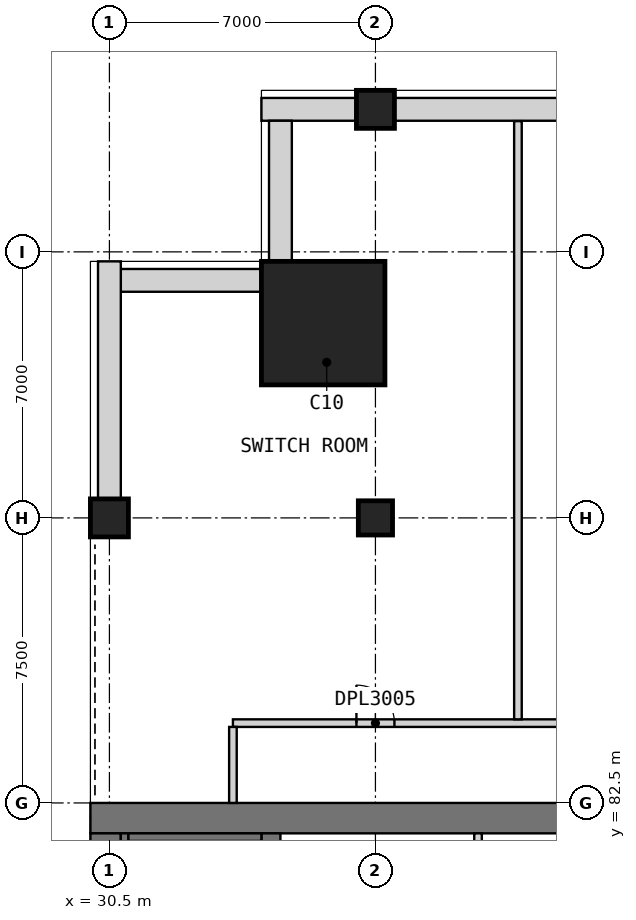
"""IFC4 building model, lengths in metres.
Left out: names, types, materials, properties, quantities, classifications, styles, units other than length and angle.
Written with IfcOpenShell. Run it as: python <this file> out.ifc"""

import sys

from ifc_helpers import new_model, si_unit, direction, frame, frame_2d, origin, origin_2d, place, context, subcontext, project, spatial, rectangle, extrude, element, fill, save


model = new_model("IFC4")
c1 = context("Model", 3, precision=1e-05, world=origin(), true_north=direction((0.0, 1.0)))
c2 = subcontext(c1, "Body", "Model", "MODEL_VIEW")
j1 = project(units=[si_unit("LENGTHUNIT", "METRE"), si_unit("PLANEANGLEUNIT", "RADIAN")], contexts=[c1])
p1 = place(None, origin())
s1 = spatial("IfcSite", under=j1, at=p1, CompositionType="ELEMENT")
p2 = place(p1, origin())
s2 = spatial("IfcBuilding", under=s1, at=p2, CompositionType="ELEMENT")
p3 = place(p2, frame((0.0, 0.0, 214.2)))
s3 = spatial("IfcBuildingStorey", under=s2, at=p3, CompositionType="ELEMENT", Elevation=214.2)
for number, where, z_axis, x_axis in (
    (1, (37.5, 100.75, 0.0), (0.0, 0.0, 1.0), (1.0, 0.0, 0.0)),
    (2, (30.5, 90.0, 0.0), (0.0, 0.0, 1.0), (1.0, 0.0, 0.0)),
):
    element("IfcColumn", number, at=place(p3, frame(where, z_axis=z_axis, x_axis=x_axis)), inside=s3, PredefinedType="COLUMN", context=c2, shape_type="SweptSolid", body=[
        extrude(rectangle(XDim=1.0, YDim=1.0, at=origin_2d()), origin(), (0.0, 0.0, 1.0), 5.5),
    ])
p4 = place(p3, frame((37.5, 90.0, 0.0), z_axis=(0.0, 0.0, 1.0), x_axis=(1.0, 0.0, 0.0)))
e3 = element("IfcColumn", 3, at=p4, inside=s3, PredefinedType="COLUMN", context=c2, shape_type="SweptSolid", body=[
    extrude(rectangle(XDim=0.9, YDim=0.9, at=origin_2d()), origin(), (0.0, 0.0, 1.0), 5.5),
])
p5 = place(p3, frame((36.125, 95.125, 0.0), z_axis=(0.0, 0.0, 1.0), x_axis=(0.0, -1.0, 0.0)))
e4 = element("IfcColumn", 4, at=p5, inside=s3, PredefinedType="COLUMN", context=c2, shape_type="SweptSolid", body=[
    extrude(rectangle(XDim=3.25, YDim=3.25, at=origin_2d()), origin(), (0.351, 0.032, 0.936), 5.877),
])
p6 = place(p3, frame((30.0, 82.1, 0.0), z_axis=(0.0, 0.0, 1.0), x_axis=(1.0, 0.0, 0.0)))
e5 = element("IfcWall", 5, at=p6, inside=s3, PredefinedType="SHEAR", context=c2, shape_type="SweptSolid", body=[
    extrude(rectangle(XDim=30.0, YDim=0.8, at=frame_2d((15.0, 0.0))), origin(), (0.0, 0.0, 1.0), 5.5),
])
p7 = place(p3, frame((30.4, 60.8, 0.0), z_axis=(0.0, 0.0, 1.0), x_axis=(0.0, 1.0, 0.0)))
e6 = element("IfcWall", 6, at=p7, inside=s3, PredefinedType="SHEAR", context=c2, shape_type="SweptSolid", body=[
    extrude(rectangle(XDim=20.9, YDim=0.8, at=frame_2d((10.45, 0.0))), origin(), (0.0, 0.0, 1.0), 5.5),
])
p8 = place(p3, frame((34.75, 78.3, 0.0), z_axis=(0.0, 0.0, 1.0), x_axis=(0.0, 1.0, 0.0)))
e7 = element("IfcWall", 7, at=p8, inside=s3, PredefinedType="SHEAR", context=c2, shape_type="SweptSolid", body=[
    extrude(rectangle(XDim=3.4, YDim=0.5, at=frame_2d((1.7, 0.0))), origin(), (0.0, 0.0, 1.0), 5.5),
])
p9 = place(p3, frame((44.5, 100.75, 0.0), z_axis=(0.0, 0.0, 1.0), x_axis=(-1.0, 0.0, 0.0)))
e8 = element("IfcWall", 8, at=p9, inside=s3, PredefinedType="ELEMENTEDWALL", context=c2, shape_type="SweptSolid", body=[
    extrude(rectangle(XDim=6.5, YDim=0.6, at=frame_2d((3.25, 0.0))), origin(), (0.0, 0.0, 1.0), 5.25),
])
p10 = place(p3, frame((37.0, 100.75, 0.0), z_axis=(0.0, 0.0, 1.0), x_axis=(-1.0, 0.0, 0.0)))
e9 = element("IfcWall", 9, at=p10, inside=s3, PredefinedType="ELEMENTEDWALL", context=c2, shape_type="SweptSolid", body=[
    extrude(rectangle(XDim=2.5, YDim=0.6, at=frame_2d((1.25, 0.0))), origin(), (0.0, 0.0, 1.0), 5.25),
])
for number, where, z_axis, x_axis in (
    (10, (35.0, 100.45, 0.0), (0.0, 0.0, 1.0), (0.0, -1.0, 0.0)),
    (11, (34.5, 96.25, 0.0), (0.0, 0.0, 1.0), (-1.0, 0.0, 0.0)),
):
    element("IfcWall", number, at=place(p3, frame(where, z_axis=z_axis, x_axis=x_axis)), inside=s3, PredefinedType="ELEMENTEDWALL", context=c2, shape_type="SweptSolid", body=[
        extrude(rectangle(XDim=3.7, YDim=0.6, at=frame_2d((1.85, 0.0))), origin(), (0.0, 0.0, 1.0), 5.25),
    ])
p11 = place(p3, frame((30.5, 96.75, 0.0), z_axis=(0.0, 0.0, 1.0), x_axis=(0.0, -1.0, 0.0)))
e12 = element("IfcWall", 12, at=p11, inside=s3, PredefinedType="ELEMENTEDWALL", context=c2, shape_type="SweptSolid", body=[
    extrude(rectangle(XDim=6.25, YDim=0.6, at=frame_2d((3.125, 0.0))), origin(), (0.0, 0.0, 1.0), 5.25),
])
p12 = place(p3, frame((40.2, 78.5, 0.0), z_axis=(0.0, 0.0, 1.0), x_axis=(0.0, 1.0, 0.0)))
e13 = element("IfcWall", 13, at=p12, inside=s3, PredefinedType="SOLIDWALL", context=c2, shape_type="SweptSolid", body=[
    extrude(rectangle(XDim=3.2, YDim=0.2, at=frame_2d((1.6, 0.0))), origin(), (0.0, 0.0, 1.0), 5.5),
])
p13 = place(p3, frame((30.9, 60.8, 0.0), z_axis=(0.0, 0.0, 1.0), x_axis=(0.0, 1.0, 0.0)))
e14 = element("IfcWall", 14, at=p13, inside=s3, PredefinedType="SOLIDWALL", context=c2, shape_type="SweptSolid", body=[
    extrude(rectangle(XDim=20.9, YDim=0.2, at=frame_2d((10.45, 0.0))), origin(), (0.0, 0.0, 1.0), 5.25),
])
p14 = place(p3, frame((31.0, 81.6, 0.0), z_axis=(0.0, 0.0, 1.0), x_axis=(1.0, 0.0, 0.0)))
e15 = element("IfcWall", 15, at=p14, inside=s3, PredefinedType="SOLIDWALL", context=c2, shape_type="SweptSolid", body=[
    extrude(rectangle(XDim=3.5, YDim=0.2, at=frame_2d((1.75, 0.0))), origin(), (0.0, 0.0, 1.0), 5.25),
])
p15 = place(p3, frame((33.75, 84.6, 0.0), z_axis=(0.0, 0.0, 1.0), x_axis=(1.0, 0.0, 0.0)))
e16 = element("IfcWall", 16, at=p15, inside=s3, PredefinedType="PARTITIONING", context=c2, shape_type="SweptSolid", body=[
    extrude(rectangle(XDim=28.35, YDim=0.2, at=frame_2d((14.175, 0.0))), origin(), (0.0, 0.0, 1.0), 5.25),
])
p16 = place(p15, frame((3.25, 0.0, 0.0)))
e17 = element("IfcOpeningElement", 17, at=p16, cuts=e16, PredefinedType="OPENING", context=c2, shape_type="SweptSolid", body=[
    extrude(rectangle(XDim=1.0, YDim=2.1, at=frame_2d((0.5, 1.05))), frame((0.0, 0.11, 0.0), z_axis=(0.0, -1.0, 0.0), x_axis=(1.0, 0.0, 0.0)), (0.0, 0.0, 1.0), 0.22),
])
p17 = place(p15, frame((14.5, 0.0, 0.0)))
e18 = element("IfcOpeningElement", 18, at=p17, cuts=e16, PredefinedType="OPENING", context=c2, shape_type="SweptSolid", body=[
    extrude(rectangle(XDim=1.0, YDim=2.1, at=frame_2d((0.5, 1.05))), frame((0.0, 0.11, 0.0), z_axis=(0.0, -1.0, 0.0), x_axis=(1.0, 0.0, 0.0)), (0.0, 0.0, 1.0), 0.22),
])
p18 = place(p15, frame((23.875, 0.0, 0.0)))
e19 = element("IfcOpeningElement", 19, at=p18, cuts=e16, PredefinedType="OPENING", context=c2, shape_type="SweptSolid", body=[
    extrude(rectangle(XDim=1.0, YDim=2.1, at=frame_2d((0.5, 1.05))), frame((0.0, 0.11, 0.0), z_axis=(0.0, -1.0, 0.0), x_axis=(1.0, 0.0, 0.0)), (0.0, 0.0, 1.0), 0.22),
])
p19 = place(p3, frame((33.75, 82.5, 0.0), z_axis=(0.0, 0.0, 1.0), x_axis=(0.0, 1.0, 0.0)))
e20 = element("IfcWall", 20, at=p19, inside=s3, PredefinedType="PARTITIONING", context=c2, shape_type="SweptSolid", body=[
    extrude(rectangle(XDim=2.0, YDim=0.2, at=frame_2d((1.0, 0.0))), origin(), (0.0, 0.0, 1.0), 5.25),
])
p20 = place(p3, frame((41.25, 84.7, 0.0), z_axis=(0.0, 0.0, 1.0), x_axis=(0.0, 1.0, 0.0)))
e21 = element("IfcWall", 21, at=p20, inside=s3, PredefinedType="PARTITIONING", context=c2, shape_type="SweptSolid", body=[
    extrude(rectangle(XDim=15.74, YDim=0.2, at=frame_2d((7.87, 0.0))), origin(), (0.0, 0.0, 1.0), 5.25),
])
p21 = place(p16, origin())
e22 = element("IfcDoor", 22, at=p21, inside=s3, OperationType="SINGLE_SWING_LEFT", PredefinedType="DOOR", context=c2, shape_type="SweptSolid", body=[
    extrude(rectangle(XDim=1.0, YDim=2.1, at=frame_2d((0.5, 1.05))), frame((0.0, 0.025, 0.0), z_axis=(0.0, -1.0, 0.0), x_axis=(1.0, 0.0, 0.0)), (0.0, 0.0, 1.0), 0.05),
])
fill(e17, e22)
save(model, sys.argv[1])
